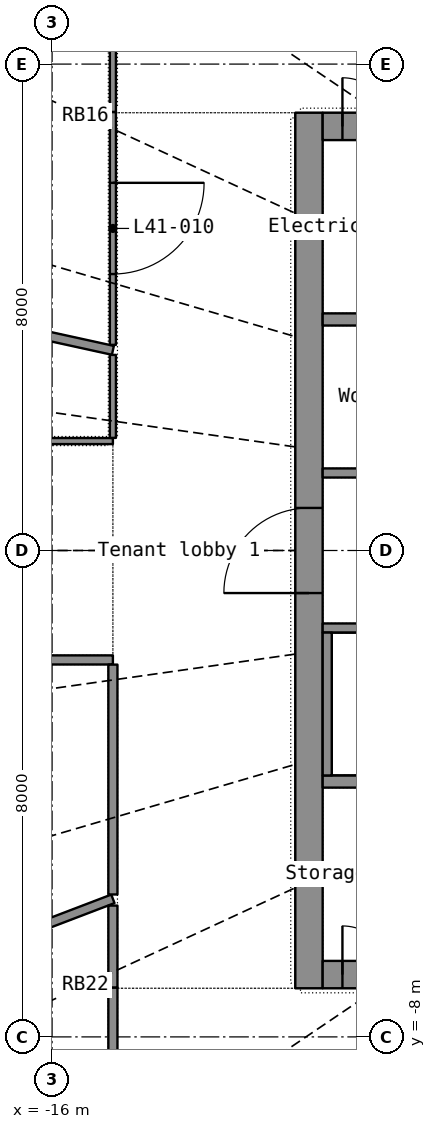
"""IFC4 building model, lengths in metres.
Left out: names, types, materials, properties, quantities, classifications, styles, units other than length and angle.
Written with IfcOpenShell. Run it as: python <this file> out.ifc"""

import sys

from ifc_helpers import new_model, si_unit, direction, frame, frame_2d, origin, place, context, subcontext, project, spatial, rectangle, extrude, element, fill, save


model = new_model("IFC4")
c1 = context("Model", 3, precision=1e-05, world=origin(), true_north=direction((0.0, 1.0)))
c2 = subcontext(c1, "Body", "Model", "MODEL_VIEW")
j1 = project(units=[si_unit("LENGTHUNIT", "METRE"), si_unit("PLANEANGLEUNIT", "RADIAN")], contexts=[c1])
p1 = place(None, origin())
s1 = spatial("IfcSite", under=j1, at=p1, CompositionType="ELEMENT")
p2 = place(p1, origin())
s2 = spatial("IfcBuilding", under=s1, at=p2, CompositionType="ELEMENT")
p3 = place(p2, frame((0.0, 0.0, 171.9)))
s3 = spatial("IfcBuildingStorey", under=s2, at=p3, CompositionType="ELEMENT", Elevation=171.9)
p4 = place(p3, frame((-11.775, -7.2, 0.0), z_axis=(0.0, 0.0, 1.0), x_axis=(0.0, 1.0, 0.0)))
e1 = element("IfcWall", 1, at=p4, inside=s3, PredefinedType="SHEAR", context=c2, shape_type="SweptSolid", body=[
    extrude(rectangle(XDim=14.4, YDim=0.45, at=frame_2d((7.2, 0.0))), origin(), (0.0, 0.0, 1.0), 3.3),
])
p5 = place(p4, frame((6.5, 0.0, 0.0)))
e2 = element("IfcOpeningElement", 2, at=p5, cuts=e1, PredefinedType="OPENING", context=c2, shape_type="SweptSolid", body=[
    extrude(rectangle(XDim=1.4, YDim=2.2, at=frame_2d((0.7, 1.1))), frame((0.0, 0.235, 0.0), z_axis=(0.0, -1.0, 0.0), x_axis=(1.0, 0.0, 0.0)), (0.0, 0.0, 1.0), 0.47),
])
p6 = place(p3, frame((-11.55, -6.975, 0.0), z_axis=(0.0, 0.0, 1.0), x_axis=(1.0, 0.0, 0.0)))
e3 = element("IfcWall", 3, at=p6, inside=s3, PredefinedType="SHEAR", context=c2, shape_type="SweptSolid", body=[
    extrude(rectangle(XDim=23.1, YDim=0.45, at=frame_2d((11.55, 0.0))), origin(), (0.0, 0.0, 1.0), 3.3),
])
p7 = place(p6, frame((20.0, 0.0, 0.0)))
e4 = element("IfcOpeningElement", 4, at=p7, cuts=e3, PredefinedType="OPENING", context=c2, shape_type="SweptSolid", body=[
    extrude(rectangle(XDim=1.1, YDim=2.2, at=frame_2d((0.55, 1.1))), frame((0.0, 0.235, 0.0), z_axis=(0.0, -1.0, 0.0), x_axis=(1.0, 0.0, 0.0)), (0.0, 0.0, 1.0), 0.47),
])
p8 = place(p6, frame((4.1, 0.0, 0.0)))
e5 = element("IfcOpeningElement", 5, at=p8, cuts=e3, PredefinedType="OPENING", context=c2, shape_type="SweptSolid", body=[
    extrude(rectangle(XDim=0.9, YDim=2.1, at=frame_2d((0.45, 1.05))), frame((0.0, 0.235, 0.0), z_axis=(0.0, -1.0, 0.0), x_axis=(1.0, 0.0, 0.0)), (0.0, 0.0, 1.0), 0.47),
])
p9 = place(p6, frame((11.1, 0.0, 0.0)))
e6 = element("IfcOpeningElement", 6, at=p9, cuts=e3, PredefinedType="OPENING", context=c2, shape_type="SweptSolid", body=[
    extrude(rectangle(XDim=0.9, YDim=2.1, at=frame_2d((0.45, 1.05))), frame((0.0, 0.235, 0.0), z_axis=(0.0, -1.0, 0.0), x_axis=(1.0, 0.0, 0.0)), (0.0, 0.0, 1.0), 0.47),
])
p10 = place(p6, frame((17.1, 0.0, 0.0)))
e7 = element("IfcOpeningElement", 7, at=p10, cuts=e3, PredefinedType="OPENING", context=c2, shape_type="SweptSolid", body=[
    extrude(rectangle(XDim=0.9, YDim=2.1, at=frame_2d((0.45, 1.05))), frame((0.0, 0.235, 0.0), z_axis=(0.0, -1.0, 0.0), x_axis=(1.0, 0.0, 0.0)), (0.0, 0.0, 1.0), 0.47),
])
p11 = place(p6, frame((0.325, 0.0, 0.0)))
e8 = element("IfcOpeningElement", 8, at=p11, cuts=e3, PredefinedType="OPENING", context=c2, shape_type="SweptSolid", body=[
    extrude(rectangle(XDim=0.8, YDim=2.05, at=frame_2d((0.4, 1.025))), frame((0.0, 0.235, 0.0), z_axis=(0.0, -1.0, 0.0), x_axis=(1.0, 0.0, 0.0)), (0.0, 0.0, 1.0), 0.47),
])
p12 = place(p6, frame((21.975, 0.0, 0.0)))
e9 = element("IfcOpeningElement", 9, at=p12, cuts=e3, PredefinedType="OPENING", context=c2, shape_type="SweptSolid", body=[
    extrude(rectangle(XDim=0.8, YDim=2.05, at=frame_2d((0.4, 1.025))), frame((0.0, 0.235, 0.0), z_axis=(0.0, -1.0, 0.0), x_axis=(1.0, 0.0, 0.0)), (0.0, 0.0, 1.0), 0.47),
])
p13 = place(p3, frame((-11.55, 6.975, 0.0), z_axis=(0.0, 0.0, 1.0), x_axis=(1.0, 0.0, 0.0)))
e10 = element("IfcWall", 10, at=p13, inside=s3, PredefinedType="SHEAR", context=c2, shape_type="SweptSolid", body=[
    extrude(rectangle(XDim=23.1, YDim=0.45, at=frame_2d((11.55, 0.0))), origin(), (0.0, 0.0, 1.0), 3.3),
])
p14 = place(p13, frame((2.0, 0.0, 0.0)))
e11 = element("IfcOpeningElement", 11, at=p14, cuts=e10, PredefinedType="OPENING", context=c2, shape_type="SweptSolid", body=[
    extrude(rectangle(XDim=1.1, YDim=2.2, at=frame_2d((0.55, 1.1))), frame((0.0, 0.235, 0.0), z_axis=(0.0, -1.0, 0.0), x_axis=(1.0, 0.0, 0.0)), (0.0, 0.0, 1.0), 0.47),
])
p15 = place(p13, frame((6.0, 0.0, 0.0)))
e12 = element("IfcOpeningElement", 12, at=p15, cuts=e10, PredefinedType="OPENING", context=c2, shape_type="SweptSolid", body=[
    extrude(rectangle(XDim=1.1, YDim=2.2, at=frame_2d((0.55, 1.1))), frame((0.0, 0.235, 0.0), z_axis=(0.0, -1.0, 0.0), x_axis=(1.0, 0.0, 0.0)), (0.0, 0.0, 1.0), 0.47),
])
p16 = place(p13, frame((8.0, 0.0, 0.0)))
e13 = element("IfcOpeningElement", 13, at=p16, cuts=e10, PredefinedType="OPENING", context=c2, shape_type="SweptSolid", body=[
    extrude(rectangle(XDim=1.1, YDim=2.2, at=frame_2d((0.55, 1.1))), frame((0.0, 0.235, 0.0), z_axis=(0.0, -1.0, 0.0), x_axis=(1.0, 0.0, 0.0)), (0.0, 0.0, 1.0), 0.47),
])
p17 = place(p13, frame((10.0, 0.0, 0.0)))
e14 = element("IfcOpeningElement", 14, at=p17, cuts=e10, PredefinedType="OPENING", context=c2, shape_type="SweptSolid", body=[
    extrude(rectangle(XDim=1.1, YDim=2.2, at=frame_2d((0.55, 1.1))), frame((0.0, 0.235, 0.0), z_axis=(0.0, -1.0, 0.0), x_axis=(1.0, 0.0, 0.0)), (0.0, 0.0, 1.0), 0.47),
])
p18 = place(p13, frame((12.0, 0.0, 0.0)))
e15 = element("IfcOpeningElement", 15, at=p18, cuts=e10, PredefinedType="OPENING", context=c2, shape_type="SweptSolid", body=[
    extrude(rectangle(XDim=1.1, YDim=2.2, at=frame_2d((0.55, 1.1))), frame((0.0, 0.235, 0.0), z_axis=(0.0, -1.0, 0.0), x_axis=(1.0, 0.0, 0.0)), (0.0, 0.0, 1.0), 0.47),
])
p19 = place(p13, frame((14.0, 0.0, 0.0)))
e16 = element("IfcOpeningElement", 16, at=p19, cuts=e10, PredefinedType="OPENING", context=c2, shape_type="SweptSolid", body=[
    extrude(rectangle(XDim=1.1, YDim=2.2, at=frame_2d((0.55, 1.1))), frame((0.0, 0.235, 0.0), z_axis=(0.0, -1.0, 0.0), x_axis=(1.0, 0.0, 0.0)), (0.0, 0.0, 1.0), 0.47),
])
p20 = place(p13, frame((16.0, 0.0, 0.0)))
e17 = element("IfcOpeningElement", 17, at=p20, cuts=e10, PredefinedType="OPENING", context=c2, shape_type="SweptSolid", body=[
    extrude(rectangle(XDim=1.1, YDim=2.2, at=frame_2d((0.55, 1.1))), frame((0.0, 0.235, 0.0), z_axis=(0.0, -1.0, 0.0), x_axis=(1.0, 0.0, 0.0)), (0.0, 0.0, 1.0), 0.47),
])
p21 = place(p13, frame((18.0, 0.0, 0.0)))
e18 = element("IfcOpeningElement", 18, at=p21, cuts=e10, PredefinedType="OPENING", context=c2, shape_type="SweptSolid", body=[
    extrude(rectangle(XDim=1.1, YDim=2.2, at=frame_2d((0.55, 1.1))), frame((0.0, 0.235, 0.0), z_axis=(0.0, -1.0, 0.0), x_axis=(1.0, 0.0, 0.0)), (0.0, 0.0, 1.0), 0.47),
])
p22 = place(p13, frame((20.0, 0.0, 0.0)))
e19 = element("IfcOpeningElement", 19, at=p22, cuts=e10, PredefinedType="OPENING", context=c2, shape_type="SweptSolid", body=[
    extrude(rectangle(XDim=1.1, YDim=2.2, at=frame_2d((0.55, 1.1))), frame((0.0, 0.235, 0.0), z_axis=(0.0, -1.0, 0.0), x_axis=(1.0, 0.0, 0.0)), (0.0, 0.0, 1.0), 0.47),
])
p23 = place(p13, frame((4.1, 0.0, 0.0)))
e20 = element("IfcOpeningElement", 20, at=p23, cuts=e10, PredefinedType="OPENING", context=c2, shape_type="SweptSolid", body=[
    extrude(rectangle(XDim=0.9, YDim=2.1, at=frame_2d((0.45, 1.05))), frame((0.0, 0.235, 0.0), z_axis=(0.0, -1.0, 0.0), x_axis=(1.0, 0.0, 0.0)), (0.0, 0.0, 1.0), 0.47),
])
p24 = place(p13, frame((0.325, 0.0, 0.0)))
e21 = element("IfcOpeningElement", 21, at=p24, cuts=e10, PredefinedType="OPENING", context=c2, shape_type="SweptSolid", body=[
    extrude(rectangle(XDim=0.8, YDim=2.05, at=frame_2d((0.4, 1.025))), frame((0.0, 0.235, 0.0), z_axis=(0.0, -1.0, 0.0), x_axis=(1.0, 0.0, 0.0)), (0.0, 0.0, 1.0), 0.47),
])
p25 = place(p13, frame((21.975, 0.0, 0.0)))
e22 = element("IfcOpeningElement", 22, at=p25, cuts=e10, PredefinedType="OPENING", context=c2, shape_type="SweptSolid", body=[
    extrude(rectangle(XDim=0.8, YDim=2.05, at=frame_2d((0.4, 1.025))), frame((0.0, 0.235, 0.0), z_axis=(0.0, -1.0, 0.0), x_axis=(1.0, 0.0, 0.0)), (0.0, 0.0, 1.0), 0.47),
])
for number, where, z_axis, x_axis in (
    (23, (-11.55, -3.8, 0.0), (0.0, 0.0, 1.0), (1.0, 0.0, 0.0)),
    (24, (-11.55, 3.8, 0.0), (0.0, 0.0, 1.0), (1.0, 0.0, 0.0)),
):
    element("IfcWall", number, at=place(p3, frame(where, z_axis=z_axis, x_axis=x_axis)), inside=s3, PredefinedType="SHEAR", context=c2, shape_type="SweptSolid", body=[
        extrude(rectangle(XDim=23.1, YDim=0.2, at=frame_2d((11.55, 0.0))), origin(), (0.0, 0.0, 1.0), 3.3),
    ])
p26 = place(p3, frame((-11.55, -1.275, 0.0), z_axis=(0.0, 0.0, 1.0), x_axis=(1.0, 0.0, 0.0)))
e25 = element("IfcWall", 25, at=p26, inside=s3, PredefinedType="SHEAR", context=c2, shape_type="SweptSolid", body=[
    extrude(rectangle(XDim=8.55, YDim=0.15, at=frame_2d((4.275, 0.0))), origin(), (0.0, 0.0, 1.0), 3.3),
])
p27 = place(p26, frame((5.4, 0.0, 0.0)))
e26 = element("IfcOpeningElement", 26, at=p27, cuts=e25, PredefinedType="OPENING", context=c2, shape_type="SweptSolid", body=[
    extrude(rectangle(XDim=1.1, YDim=2.15, at=frame_2d((0.55, 1.075))), frame((0.0, 0.085, 0.0), z_axis=(0.0, -1.0, 0.0), x_axis=(1.0, 0.0, 0.0)), (0.0, 0.0, 1.0), 0.17),
])
p28 = place(p26, frame((7.2, 0.0, 0.0)))
e27 = element("IfcOpeningElement", 27, at=p28, cuts=e25, PredefinedType="OPENING", context=c2, shape_type="SweptSolid", body=[
    extrude(rectangle(XDim=0.9, YDim=2.1, at=frame_2d((0.45, 1.05))), frame((0.0, 0.085, 0.0), z_axis=(0.0, -1.0, 0.0), x_axis=(1.0, 0.0, 0.0)), (0.0, 0.0, 1.0), 0.17),
])
p29 = place(p3, frame((-11.55, 1.275, 0.0), z_axis=(0.0, 0.0, 1.0), x_axis=(1.0, 0.0, 0.0)))
e28 = element("IfcWall", 28, at=p29, inside=s3, PredefinedType="PARTITIONING", context=c2, shape_type="SweptSolid", body=[
    extrude(rectangle(XDim=8.55, YDim=0.15, at=frame_2d((4.275, 0.0))), origin(), (0.0, 0.0, 1.0), 3.3),
])
p30 = place(p29, frame((0.79, 0.0, 0.0)))
e29 = element("IfcOpeningElement", 29, at=p30, cuts=e28, PredefinedType="OPENING", context=c2, shape_type="SweptSolid", body=[
    extrude(rectangle(XDim=0.85, YDim=2.1, at=frame_2d((0.425, 1.05))), frame((0.0, 0.085, 0.0), z_axis=(0.0, -1.0, 0.0), x_axis=(1.0, 0.0, 0.0)), (0.0, 0.0, 1.0), 0.17),
])
p31 = place(p29, frame((3.37, 0.0, 0.0)))
e30 = element("IfcOpeningElement", 30, at=p31, cuts=e28, PredefinedType="OPENING", context=c2, shape_type="SweptSolid", body=[
    extrude(rectangle(XDim=0.85, YDim=2.1, at=frame_2d((0.425, 1.05))), frame((0.0, 0.085, 0.0), z_axis=(0.0, -1.0, 0.0), x_axis=(1.0, 0.0, 0.0)), (0.0, 0.0, 1.0), 0.17),
])
p32 = place(p29, frame((5.52, 0.0, 0.0)))
e31 = element("IfcOpeningElement", 31, at=p32, cuts=e28, PredefinedType="OPENING", context=c2, shape_type="SweptSolid", body=[
    extrude(rectangle(XDim=0.9, YDim=2.1, at=frame_2d((0.45, 1.05))), frame((0.0, 0.085, 0.0), z_axis=(0.0, -1.0, 0.0), x_axis=(1.0, 0.0, 0.0)), (0.0, 0.0, 1.0), 0.17),
])
p33 = place(p29, frame((7.29, 0.0, 0.0)))
e32 = element("IfcOpeningElement", 32, at=p33, cuts=e28, PredefinedType="OPENING", context=c2, shape_type="SweptSolid", body=[
    extrude(rectangle(XDim=0.9, YDim=2.1, at=frame_2d((0.45, 1.05))), frame((0.0, 0.085, 0.0), z_axis=(0.0, -1.0, 0.0), x_axis=(1.0, 0.0, 0.0)), (0.0, 0.0, 1.0), 0.17),
])
p34 = place(p3, frame((-11.475, -3.7, 0.0), z_axis=(0.0, 0.0, 1.0), x_axis=(0.0, 1.0, 0.0)))
e33 = element("IfcWall", 33, at=p34, inside=s3, PredefinedType="SHEAR", context=c2, shape_type="SweptSolid", body=[
    extrude(rectangle(XDim=2.35, YDim=0.15, at=frame_2d((1.175, 0.0))), origin(), (0.0, 0.0, 1.0), 3.3),
])
p35 = place(p3, frame((-22.61, 4.962, 0.0), z_axis=(0.0, 0.0, 1.0), x_axis=(0.976752185, -0.214371566, 0.0)))
e34 = element("IfcWall", 34, at=p35, inside=s3, PredefinedType="PARTITIONING", context=c2, shape_type="SweptSolid", body=[
    extrude(rectangle(XDim=7.791, YDim=0.15, at=frame_2d((3.896, 0.0))), origin(), (0.0, 0.0, 1.0), 2.4),
])
p36 = place(p3, frame((-21.21, -8.101, 0.0), z_axis=(0.0, 0.0, 1.0), x_axis=(0.934180775, 0.356800056, 0.0)))
e35 = element("IfcWall", 35, at=p36, inside=s3, PredefinedType="PARTITIONING", context=c2, shape_type="SweptSolid", body=[
    extrude(rectangle(XDim=6.647, YDim=0.15, at=frame_2d((3.324, 0.0))), origin(), (0.0, 0.0, 1.0), 2.4),
])
p37 = place(p3, frame((-20.766, -1.8, 0.0), z_axis=(0.0, 0.0, 1.0), x_axis=(1.0, 0.0, 0.0)))
e36 = element("IfcWall", 36, at=p37, inside=s3, PredefinedType="PARTITIONING", context=c2, shape_type="SweptSolid", body=[
    extrude(rectangle(XDim=5.766, YDim=0.15, at=frame_2d((2.883, 0.0))), origin(), (0.0, 0.0, 1.0), 2.4),
])
p38 = place(p37, frame((2.408, 0.0, 0.0)))
e37 = element("IfcOpeningElement", 37, at=p38, cuts=e36, PredefinedType="OPENING", context=c2, shape_type="SweptSolid", body=[
    extrude(rectangle(XDim=0.95, YDim=2.15, at=frame_2d((0.475, 1.075))), frame((0.0, 0.085, 0.0), z_axis=(0.0, -1.0, 0.0), x_axis=(1.0, 0.0, 0.0)), (0.0, 0.0, 1.0), 0.17),
])
p39 = place(p3, frame((-15.0, 1.8, 0.0), z_axis=(0.0, 0.0, 1.0), x_axis=(-1.0, 0.0, 0.0)))
e38 = element("IfcWall", 38, at=p39, inside=s3, PredefinedType="PARTITIONING", context=c2, shape_type="SweptSolid", body=[
    extrude(rectangle(XDim=5.766, YDim=0.1, at=frame_2d((2.883, 0.0))), origin(), (0.0, 0.0, 1.0), 2.4),
])
p40 = place(p39, frame((2.133, 0.0, 0.0)))
e39 = element("IfcOpeningElement", 39, at=p40, cuts=e38, PredefinedType="OPENING", context=c2, shape_type="SweptSolid", body=[
    extrude(rectangle(XDim=1.5, YDim=2.4, at=frame_2d((0.75, 1.2))), frame((0.0, 0.06, 0.0), z_axis=(0.0, -1.0, 0.0), x_axis=(1.0, 0.0, 0.0)), (0.0, 0.0, 1.0), 0.12),
])
p41 = place(p3, frame((-15.0, -1.877, 0.0), z_axis=(0.0, 0.0, 1.0), x_axis=(0.0, -1.0, 0.0)))
e40 = element("IfcWall", 40, at=p41, inside=s3, PredefinedType="PARTITIONING", context=c2, shape_type="SweptSolid", body=[
    extrude(rectangle(XDim=3.78, YDim=0.15, at=frame_2d((1.89, 0.0))), origin(), (0.0, 0.0, 1.0), 2.4),
])
p42 = place(p3, frame((-15.0, 7.212, 0.0), z_axis=(0.0, 0.0, 1.0), x_axis=(0.0, -1.0, 0.0)))
e41 = element("IfcWall", 41, at=p42, inside=s3, PredefinedType="PARTITIONING", context=c2, shape_type="SweptSolid", body=[
    extrude(rectangle(XDim=3.83, YDim=0.1, at=frame_2d((1.915, 0.0))), origin(), (0.0, 0.0, 1.0), 2.4),
])
p43 = place(p42, frame((1.165, 0.0, 0.0)))
e42 = element("IfcOpeningElement", 42, at=p43, cuts=e41, PredefinedType="OPENING", context=c2, shape_type="SweptSolid", body=[
    extrude(rectangle(XDim=1.5, YDim=2.4, at=frame_2d((0.75, 1.2))), frame((0.0, 0.06, 0.0), z_axis=(0.0, -1.0, 0.0), x_axis=(1.0, 0.0, 0.0)), (0.0, 0.0, 1.0), 0.12),
])
p44 = place(p3, frame((-15.0, -7.188, 0.0), z_axis=(0.0, 0.0, 1.0), x_axis=(0.0, -1.0, 0.0)))
e43 = element("IfcWall", 43, at=p44, inside=s3, PredefinedType="PARTITIONING", context=c2, shape_type="SweptSolid", body=[
    extrude(rectangle(XDim=2.335, YDim=0.15, at=frame_2d((1.167, 0.0))), origin(), (0.0, 0.0, 1.0), 2.4),
])
p45 = place(p3, frame((-15.0, 3.217, 0.0), z_axis=(0.0, 0.0, 1.0), x_axis=(0.0, -1.0, 0.0)))
e44 = element("IfcWall", 44, at=p45, inside=s3, PredefinedType="PARTITIONING", context=c2, shape_type="SweptSolid", body=[
    extrude(rectangle(XDim=1.365, YDim=0.1, at=frame_2d((0.682, 0.0))), origin(), (0.0, 0.0, 1.0), 2.4),
])
p46 = place(p3, frame((-15.0, -5.84, 0.0), z_axis=(0.0, 0.0, 1.0), x_axis=(0.0, -1.0, 0.0)))
e45 = element("IfcWall", 45, at=p46, inside=s3, PredefinedType="PARTITIONING", context=c2, shape_type="SweptSolid", body=[
    extrude(rectangle(XDim=1.347, YDim=0.15, at=frame_2d((0.673, 0.0))), origin(), (0.0, 0.0, 1.0), 2.4),
])
p47 = place(p3, frame((-15.0, 8.536, 0.0), z_axis=(0.0, 0.0, 1.0), x_axis=(0.0, -1.0, 0.0)))
e46 = element("IfcWall", 46, at=p47, inside=s3, PredefinedType="PARTITIONING", context=c2, shape_type="SweptSolid", body=[
    extrude(rectangle(XDim=1.323, YDim=0.1, at=frame_2d((0.662, 0.0))), origin(), (0.0, 0.0, 1.0), 2.4),
])
p48 = place(p11, origin())
e47 = element("IfcDoor", 47, at=p48, inside=s3, OperationType="SINGLE_SWING_LEFT", PredefinedType="DOOR", context=c2, shape_type="SweptSolid", body=[
    extrude(rectangle(XDim=0.8, YDim=2.05, at=frame_2d((0.4, 1.025))), frame((0.0, 0.025, 0.0), z_axis=(0.0, -1.0, 0.0), x_axis=(1.0, 0.0, 0.0)), (0.0, 0.0, 1.0), 0.05),
])
fill(e8, e47)
p49 = place(p24, origin())
e48 = element("IfcDoor", 48, at=p49, inside=s3, OperationType="SINGLE_SWING_LEFT", PredefinedType="DOOR", context=c2, shape_type="SweptSolid", body=[
    extrude(rectangle(XDim=0.8, YDim=2.05, at=frame_2d((0.4, 1.025))), frame((0.0, 0.025, 0.0), z_axis=(0.0, -1.0, 0.0), x_axis=(1.0, 0.0, 0.0)), (0.0, 0.0, 1.0), 0.05),
])
fill(e21, e48)
p50 = place(p5, origin())
e49 = element("IfcDoor", 49, at=p50, inside=s3, OperationType="DOUBLE_DOOR_SINGLE_SWING", PredefinedType="DOOR", context=c2, shape_type="SweptSolid", body=[
    extrude(rectangle(XDim=1.4, YDim=2.2, at=frame_2d((0.7, 1.1))), frame((0.0, 0.025, 0.0), z_axis=(0.0, -1.0, 0.0), x_axis=(1.0, 0.0, 0.0)), (0.0, 0.0, 1.0), 0.05),
])
fill(e2, e49)
p51 = place(p43, origin())
e50 = element("IfcDoor", 50, at=p51, inside=s3, OperationType="DOUBLE_DOOR_SINGLE_SWING", PredefinedType="DOOR", context=c2, shape_type="SweptSolid", body=[
    extrude(rectangle(XDim=1.5, YDim=2.4, at=frame_2d((0.75, 1.2))), frame((0.0, 0.025, 0.0), z_axis=(0.0, -1.0, 0.0), x_axis=(1.0, 0.0, 0.0)), (0.0, 0.0, 1.0), 0.05),
])
fill(e42, e50)
save(model, sys.argv[1])
